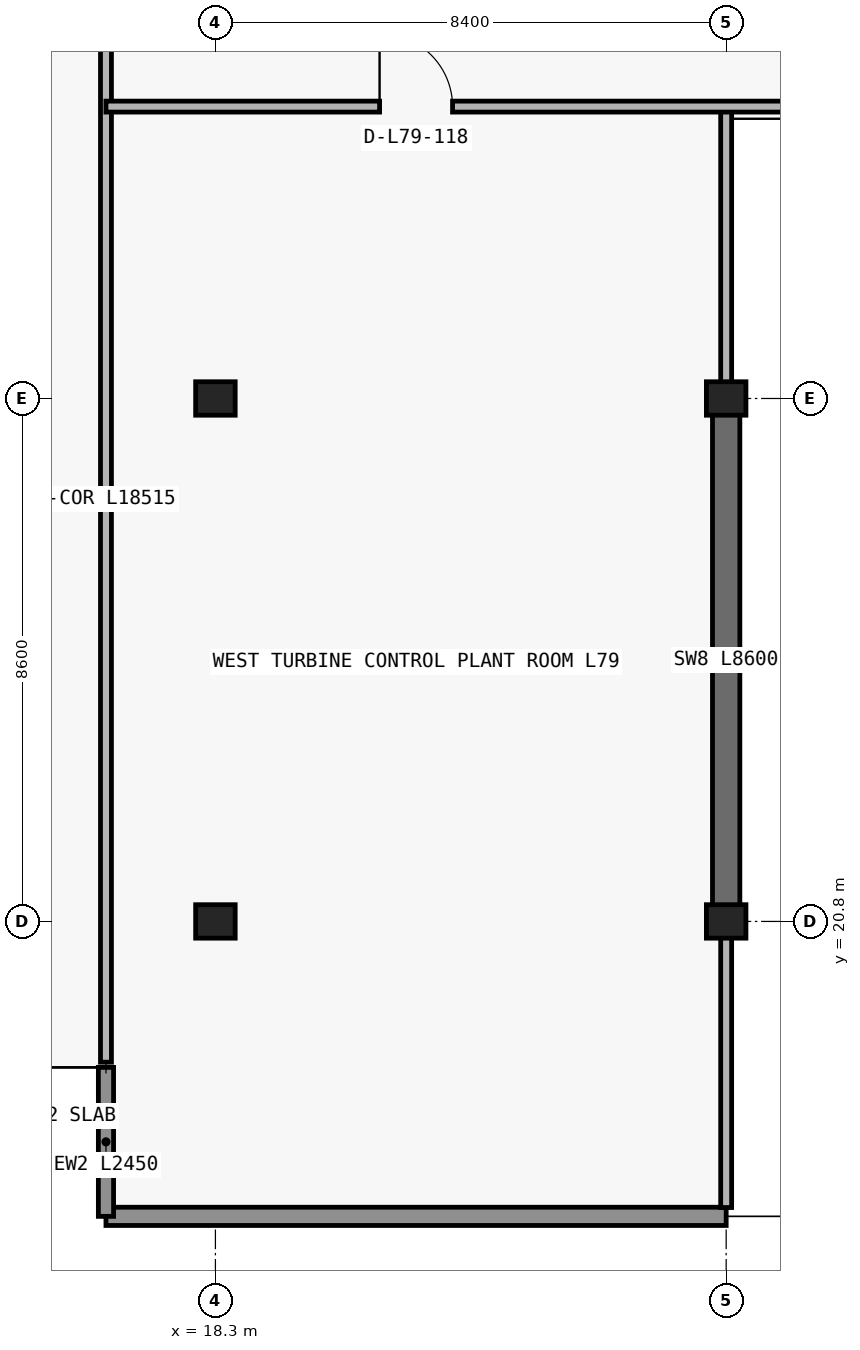
"""IFC4 building model, lengths in metres.
Left out: names, types, materials, properties, quantities, classifications, styles, units other than length and angle.
Written with IfcOpenShell. Run it as: python <this file> out.ifc"""

import sys

from ifc_helpers import new_model, si_unit, direction, frame, frame_2d, origin, origin_2d, place, context, subcontext, project, spatial, rectangle, extrude, element, fill, save


model = new_model("IFC4")
c1 = context("Model", 3, precision=1e-05, world=origin(), true_north=direction((0.0, 1.0)))
c2 = subcontext(c1, "Body", "Model", "MODEL_VIEW")
j1 = project(units=[si_unit("LENGTHUNIT", "METRE"), si_unit("PLANEANGLEUNIT", "RADIAN")], contexts=[c1])
p1 = place(None, origin())
s1 = spatial("IfcSite", under=j1, at=p1, CompositionType="ELEMENT")
p2 = place(p1, origin())
s2 = spatial("IfcBuilding", under=s1, at=p2, CompositionType="ELEMENT")
p3 = place(p2, frame((0.0, 0.0, 284.8)))
s3 = spatial("IfcBuildingStorey", under=s2, at=p3, CompositionType="ELEMENT", Elevation=284.8)
for number, where, z_axis, x_axis in (
    (1, (18.3, 20.8, 0.0), (0.0, 0.0, 1.0), (1.0, 0.0, 0.0)),
    (2, (26.7, 20.8, 0.0), (0.0, 0.0, 1.0), (1.0, 0.0, 0.0)),
    (3, (18.3, 29.4, 0.0), (0.0, 0.0, 1.0), (1.0, 0.0, 0.0)),
    (4, (26.7, 29.4, 0.0), (0.0, 0.0, 1.0), (1.0, 0.0, 0.0)),
):
    element("IfcColumn", number, at=place(p3, frame(where, z_axis=z_axis, x_axis=x_axis)), inside=s3, PredefinedType="COLUMN", context=c2, shape_type="SweptSolid", body=[
        extrude(rectangle(XDim=0.65, YDim=0.55, at=origin_2d()), origin(), (0.0, 0.0, 1.0), 5.1),
    ])
p4 = place(p3, frame((26.7, 20.8, 0.0), z_axis=(0.0, 0.0, 1.0), x_axis=(0.0, 1.0, 0.0)))
e5 = element("IfcWall", 5, at=p4, inside=s3, PredefinedType="SHEAR", context=c2, shape_type="SweptSolid", body=[
    extrude(rectangle(XDim=8.6, YDim=0.45, at=frame_2d((4.3, 0.0))), origin(), (0.0, 0.0, 1.0), 5.1),
])
p5 = place(p3, frame((26.7, 15.95, 0.0), z_axis=(0.0, 0.0, 1.0), x_axis=(-1.0, 0.0, 0.0)))
e6 = element("IfcWall", 6, at=p5, inside=s3, PredefinedType="STANDARD", context=c2, shape_type="SweptSolid", body=[
    extrude(rectangle(XDim=10.2, YDim=0.3, at=frame_2d((5.1, 0.0))), origin(), (0.0, 0.0, 1.0), 5.1),
])
p6 = place(p3, frame((16.5, 18.4, 0.0), z_axis=(0.0, 0.0, 1.0), x_axis=(0.0, -1.0, 0.0)))
e7 = element("IfcWall", 7, at=p6, inside=s3, PredefinedType="ELEMENTEDWALL", context=c2, shape_type="SweptSolid", body=[
    extrude(rectangle(XDim=2.45, YDim=0.25, at=frame_2d((1.225, 0.0))), origin(), (0.0, 0.0, 1.0), 5.1),
])
p7 = place(p3, frame((16.5, 18.485, 0.0), z_axis=(0.0, 0.0, 1.0), x_axis=(0.0, 1.0, 0.0)))
e8 = element("IfcWall", 8, at=p7, inside=s3, PredefinedType="PARTITIONING", context=c2, shape_type="SweptSolid", body=[
    extrude(rectangle(XDim=18.515, YDim=0.18, at=frame_2d((9.257, 0.0))), origin(), (0.0, 0.0, 1.0), 5.1),
])
p8 = place(p3, frame((26.7, 16.095, 0.0), z_axis=(0.0, 0.0, 1.0), x_axis=(0.0, 1.0, 0.0)))
e9 = element("IfcWall", 9, at=p8, inside=s3, PredefinedType="PARTITIONING", context=c2, shape_type="SweptSolid", body=[
    extrude(rectangle(XDim=4.7, YDim=0.18, at=frame_2d((2.35, 0.0))), origin(), (0.0, 0.0, 1.0), 5.1),
])
p9 = place(p3, frame((26.7, 29.405, 0.0), z_axis=(0.0, 0.0, 1.0), x_axis=(0.0, 1.0, 0.0)))
e10 = element("IfcWall", 10, at=p9, inside=s3, PredefinedType="PARTITIONING", context=c2, shape_type="SweptSolid", body=[
    extrude(rectangle(XDim=4.795, YDim=0.18, at=frame_2d((2.397, 0.0))), origin(), (0.0, 0.0, 1.0), 4.385),
])
p10 = place(p3, frame((16.5, 34.2, 0.0), z_axis=(0.0, 0.0, 1.0), x_axis=(1.0, 0.0, 0.0)))
e11 = element("IfcWall", 11, at=p10, inside=s3, PredefinedType="PARTITIONING", context=c2, shape_type="SweptSolid", body=[
    extrude(rectangle(XDim=44.8, YDim=0.18, at=frame_2d((22.4, 0.0))), origin(), (0.0, 0.0, 1.0), 5.1),
])
p11 = place(p10, frame((4.5, 0.0, 0.0)))
e12 = element("IfcOpeningElement", 12, at=p11, cuts=e11, PredefinedType="OPENING", context=c2, shape_type="SweptSolid", body=[
    extrude(rectangle(XDim=1.2, YDim=2.2, at=frame_2d((0.6, 1.1))), frame((0.0, 0.1, 0.0), z_axis=(0.0, -1.0, 0.0), x_axis=(1.0, 0.0, 0.0)), (0.0, 0.0, 1.0), 0.2),
])
p12 = place(p10, frame((39.1, 0.0, 0.0)))
e13 = element("IfcOpeningElement", 13, at=p12, cuts=e11, PredefinedType="OPENING", context=c2, shape_type="SweptSolid", body=[
    extrude(rectangle(XDim=1.2, YDim=2.2, at=frame_2d((0.6, 1.1))), frame((0.0, 0.1, 0.0), z_axis=(0.0, -1.0, 0.0), x_axis=(1.0, 0.0, 0.0)), (0.0, 0.0, 1.0), 0.2),
])
p13 = place(p11, origin())
e14 = element("IfcDoor", 14, at=p13, inside=s3, OperationType="SINGLE_SWING_LEFT", PredefinedType="DOOR", context=c2, shape_type="SweptSolid", body=[
    extrude(rectangle(XDim=1.2, YDim=2.2, at=frame_2d((0.6, 1.1))), frame((0.0, 0.025, 0.0), z_axis=(0.0, -1.0, 0.0), x_axis=(1.0, 0.0, 0.0)), (0.0, 0.0, 1.0), 0.05),
])
fill(e12, e14)
save(model, sys.argv[1])
